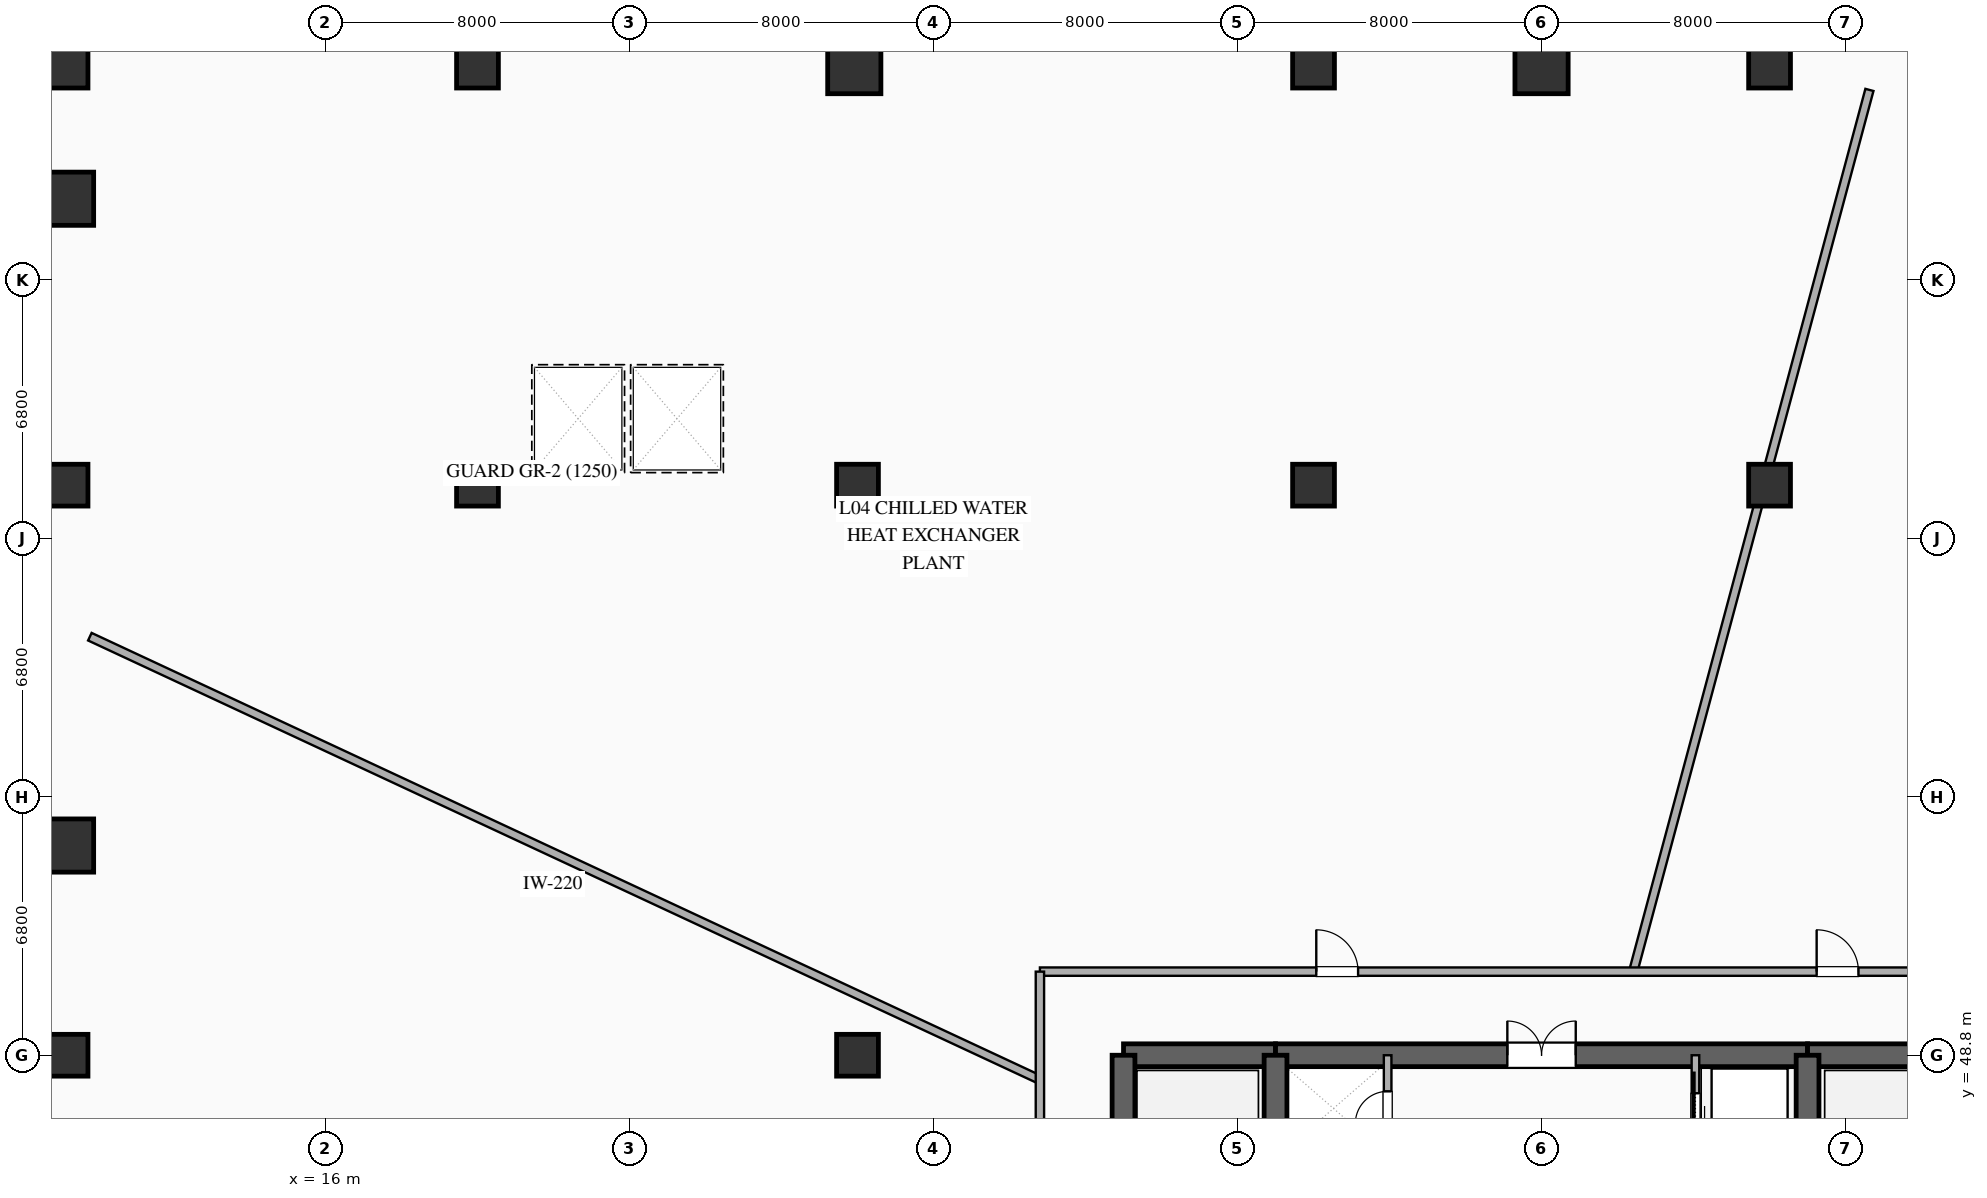
"""IFC4 building model, lengths in metres.
Left out: names, types, materials, properties, quantities, classifications, styles, units other than length and angle.
Written with IfcOpenShell. Run it as: python <this file> out.ifc"""

import sys

from ifc_helpers import new_model, si_unit, direction, frame, frame_2d, origin, origin_2d, place, context, subcontext, project, spatial, rectangle, extrude, element, fill, save


model = new_model("IFC4")
c1 = context("Model", 3, precision=1e-05, world=origin(), true_north=direction((0.0, 1.0)))
c2 = subcontext(c1, "Body", "Model", "MODEL_VIEW")
j1 = project(units=[si_unit("LENGTHUNIT", "METRE"), si_unit("PLANEANGLEUNIT", "RADIAN")], contexts=[c1])
p1 = place(None, origin())
s1 = spatial("IfcSite", under=j1, at=p1, CompositionType="ELEMENT")
p2 = place(p1, origin())
s2 = spatial("IfcBuilding", under=s1, at=p2, CompositionType="ELEMENT")
p3 = place(p2, frame((0.0, 0.0, 22.2)))
s3 = spatial("IfcBuildingStorey", under=s2, at=p3, CompositionType="ELEMENT", Elevation=22.2)
p4 = place(p3, frame((37.0, 48.8, 0.0), z_axis=(0.0, 0.0, 1.0), x_axis=(1.0, 0.0, 0.0)))
e1 = element("IfcWall", 1, at=p4, inside=s3, PredefinedType="SHEAR", context=c2, shape_type="SweptSolid", body=[
    extrude(rectangle(XDim=4.0, YDim=0.6, at=frame_2d((2.0, 0.0))), origin(), (0.0, 0.0, 1.0), 5.75),
])
p5 = place(p3, frame((41.0, 48.8, 0.0), z_axis=(0.0, 0.0, 1.0), x_axis=(1.0, 0.0, 0.0)))
e2 = element("IfcWall", 2, at=p5, inside=s3, PredefinedType="SHEAR", context=c2, shape_type="SweptSolid", body=[
    extrude(rectangle(XDim=14.0, YDim=0.6, at=frame_2d((7.0, 0.0))), origin(), (0.0, 0.0, 1.0), 5.75),
])
p6 = place(p5, frame((6.1, 0.0, 0.0)))
e3 = element("IfcOpeningElement", 3, at=p6, cuts=e2, PredefinedType="OPENING", context=c2, shape_type="SweptSolid", body=[
    extrude(rectangle(XDim=1.8, YDim=2.25, at=frame_2d((0.9, 1.125))), frame((0.0, 0.31, 0.0), z_axis=(0.0, -1.0, 0.0), x_axis=(1.0, 0.0, 0.0)), (0.0, 0.0, 1.0), 0.62),
])
p7 = place(p3, frame((55.0, 48.8, 0.0), z_axis=(0.0, 0.0, 1.0), x_axis=(1.0, 0.0, 0.0)))
e4 = element("IfcWall", 4, at=p7, inside=s3, PredefinedType="SHEAR", context=c2, shape_type="SweptSolid", body=[
    extrude(rectangle(XDim=4.0, YDim=0.6, at=frame_2d((2.0, 0.0))), origin(), (0.0, 0.0, 1.0), 5.75),
])
p8 = place(p3, frame((37.0, 35.2, 0.0), z_axis=(0.0, 0.0, 1.0), x_axis=(0.0, 1.0, 0.0)))
e5 = element("IfcWall", 5, at=p8, inside=s3, PredefinedType="SHEAR", context=c2, shape_type="SweptSolid", body=[
    extrude(rectangle(XDim=13.6, YDim=0.6, at=frame_2d((6.8, 0.0))), origin(), (0.0, 0.0, 1.0), 5.75),
])
p9 = place(p8, frame((1.5, 0.0, 0.0)))
e6 = element("IfcOpeningElement", 6, at=p9, cuts=e5, PredefinedType="OPENING", context=c2, shape_type="SweptSolid", body=[
    extrude(rectangle(XDim=1.2, YDim=2.15, at=frame_2d((0.6, 1.075))), frame((0.0, 0.31, 0.0), z_axis=(0.0, -1.0, 0.0), x_axis=(1.0, 0.0, 0.0)), (0.0, 0.0, 1.0), 0.62),
])
p10 = place(p3, frame((41.0, 35.2, 0.0), z_axis=(0.0, 0.0, 1.0), x_axis=(0.0, 1.0, 0.0)))
e7 = element("IfcWall", 7, at=p10, inside=s3, PredefinedType="SHEAR", context=c2, shape_type="SweptSolid", body=[
    extrude(rectangle(XDim=13.6, YDim=0.6, at=frame_2d((6.8, 0.0))), origin(), (0.0, 0.0, 1.0), 5.75),
])
p11 = place(p10, frame((1.15, 0.0, 0.0)))
e8 = element("IfcOpeningElement", 8, at=p11, cuts=e7, PredefinedType="OPENING", context=c2, shape_type="SweptSolid", body=[
    extrude(rectangle(XDim=1.1, YDim=2.2, at=frame_2d((0.55, 1.1))), frame((0.0, 0.31, 0.0), z_axis=(0.0, -1.0, 0.0), x_axis=(1.0, 0.0, 0.0)), (0.0, 0.0, 1.0), 0.62),
])
p12 = place(p3, frame((55.0, 35.2, 0.0), z_axis=(0.0, 0.0, 1.0), x_axis=(0.0, 1.0, 0.0)))
e9 = element("IfcWall", 9, at=p12, inside=s3, PredefinedType="SHEAR", context=c2, shape_type="SweptSolid", body=[
    extrude(rectangle(XDim=13.6, YDim=0.6, at=frame_2d((6.8, 0.0))), origin(), (0.0, 0.0, 1.0), 5.75),
])
p13 = place(p12, frame((1.15, 0.0, 0.0)))
e10 = element("IfcOpeningElement", 10, at=p13, cuts=e9, PredefinedType="OPENING", context=c2, shape_type="SweptSolid", body=[
    extrude(rectangle(XDim=1.1, YDim=2.2, at=frame_2d((0.55, 1.1))), frame((0.0, 0.31, 0.0), z_axis=(0.0, -1.0, 0.0), x_axis=(1.0, 0.0, 0.0)), (0.0, 0.0, 1.0), 0.62),
])
for number, where, z_axis, x_axis in (
    (11, (9.2, 74.8, 0.0), (0.0, 0.0, 1.0), (1.0, 0.0, 0.0)),
    (12, (9.2, 63.8, 0.0), (0.0, 0.0, 1.0), (1.0, 0.0, 0.0)),
    (13, (20.0, 74.8, 0.0), (0.0, 0.0, 1.0), (1.0, 0.0, 0.0)),
    (14, (20.0, 63.8, 0.0), (0.0, 0.0, 1.0), (1.0, 0.0, 0.0)),
    (15, (30.0, 63.8, 0.0), (0.0, 0.0, 1.0), (1.0, 0.0, 0.0)),
    (16, (42.0, 74.8, 0.0), (0.0, 0.0, 1.0), (1.0, 0.0, 0.0)),
    (17, (42.0, 63.8, 0.0), (0.0, 0.0, 1.0), (1.0, 0.0, 0.0)),
    (18, (54.0, 74.8, 0.0), (0.0, 0.0, 1.0), (1.0, 0.0, 0.0)),
    (19, (54.0, 63.8, 0.0), (0.0, 0.0, 1.0), (1.0, 0.0, 0.0)),
    (20, (9.2, 48.8, 0.0), (0.0, 0.0, 1.0), (1.0, 0.0, 0.0)),
    (21, (30.0, 48.8, 0.0), (0.0, 0.0, 1.0), (1.0, 0.0, 0.0)),
):
    element("IfcColumn", number, at=place(p3, frame(where, z_axis=z_axis, x_axis=x_axis)), inside=s3, PredefinedType="COLUMN", context=c2, shape_type="SweptSolid", body=[
        extrude(rectangle(XDim=1.1, YDim=1.1, at=origin_2d()), origin(), (0.0, 0.0, 1.0), 5.75),
    ])
for number, where, z_axis, x_axis in (
    (22, (48.0, 74.8, 0.0), (0.0, 0.0, 1.0), (1.0, 0.0, 0.0)),
    (23, (29.916, 74.8, 0.0), (0.0, 0.0, 1.0), (1.0, 0.0, 0.0)),
    (24, (9.2, 71.337, 0.0), (0.0, 0.0, 1.0), (1.0, 0.0, 0.0)),
    (25, (9.2, 54.318, 0.0), (0.0, 0.0, 1.0), (1.0, 0.0, 0.0)),
):
    element("IfcColumn", number, at=place(p3, frame(where, z_axis=z_axis, x_axis=x_axis)), inside=s3, PredefinedType="COLUMN", context=c2, shape_type="SweptSolid", body=[
        extrude(rectangle(XDim=1.4, YDim=1.4, at=origin_2d()), origin(), (0.0, 0.0, 1.0), 5.75),
    ])
p14 = place(p3, frame((9.65, 75.85, 0.0), z_axis=(0.0, 0.0, 1.0), x_axis=(-0.707106781187, -0.707106781187, 0.0)))
e26 = element("IfcWall", 26, at=p14, inside=s3, PredefinedType="SOLIDWALL", context=c2, shape_type="SweptSolid", body=[
    extrude(rectangle(XDim=2.121, YDim=0.3, at=frame_2d((1.061, 0.0))), origin(), (0.0, 0.0, 1.0), 5.75),
])
p15 = place(p3, frame((43.95, 46.2, 0.0), z_axis=(0.0, 0.0, 1.0), x_axis=(0.0, 1.0, 0.0)))
e27 = element("IfcWall", 27, at=p15, inside=s3, PredefinedType="SOLIDWALL", context=c2, shape_type="SweptSolid", body=[
    extrude(rectangle(XDim=2.6, YDim=0.2, at=frame_2d((1.3, 0.0))), origin(), (0.0, 0.0, 1.0), 2.5),
])
p16 = place(p15, frame((0.8, 0.0, 0.0)))
e28 = element("IfcOpeningElement", 28, at=p16, cuts=e27, PredefinedType="OPENING", context=c2, shape_type="SweptSolid", body=[
    extrude(rectangle(XDim=0.85, YDim=2.15, at=frame_2d((0.425, 1.075))), frame((0.0, 0.11, 0.0), z_axis=(0.0, -1.0, 0.0), x_axis=(1.0, 0.0, 0.0)), (0.0, 0.0, 1.0), 0.22),
])
p17 = place(p3, frame((52.05, 38.4, 0.0), z_axis=(0.0, 0.0, 1.0), x_axis=(0.0, 1.0, 0.0)))
e29 = element("IfcWall", 29, at=p17, inside=s3, PredefinedType="SOLIDWALL", context=c2, shape_type="SweptSolid", body=[
    extrude(rectangle(XDim=10.4, YDim=0.2, at=frame_2d((5.2, 0.0))), origin(), (0.0, 0.0, 1.0), 2.5),
])
p18 = place(p17, frame((8.2, 0.0, 0.0)))
e30 = element("IfcOpeningElement", 30, at=p18, cuts=e29, PredefinedType="OPENING", context=c2, shape_type="SweptSolid", body=[
    extrude(rectangle(XDim=1.2, YDim=2.2, at=frame_2d((0.6, 1.1))), frame((0.0, 0.11, 0.0), z_axis=(0.0, -1.0, 0.0), x_axis=(1.0, 0.0, 0.0)), (0.0, 0.0, 1.0), 0.22),
])
p19 = place(p3, frame((34.8, 48.155, 0.0), z_axis=(0.0, 0.0, 1.0), x_axis=(-0.906307462258, 0.422618958231, 0.0)))
e31 = element("IfcWall", 31, at=p19, inside=s3, PredefinedType="SOLIDWALL", context=c2, shape_type="SweptSolid", body=[
    extrude(rectangle(XDim=27.584, YDim=0.22, at=frame_2d((13.792, 0.0))), origin(), (0.0, 0.0, 1.0), 2.5),
])
p20 = place(p3, frame((50.412, 51.0, 0.0), z_axis=(0.0, 0.0, 1.0), x_axis=(0.25881517655, 0.965926862856, 0.0)))
e32 = element("IfcWall", 32, at=p20, inside=s3, PredefinedType="SOLIDWALL", context=c2, shape_type="SweptSolid", body=[
    extrude(rectangle(XDim=24.018, YDim=0.22, at=frame_2d((12.009, 0.0))), origin(), (0.0, 0.0, 1.0), 2.5),
])
p21 = place(p3, frame((34.8, 51.0, 0.0), z_axis=(0.0, 0.0, 1.0), x_axis=(1.0, 0.0, 0.0)))
e33 = element("IfcWall", 33, at=p21, inside=s3, PredefinedType="SOLIDWALL", context=c2, shape_type="SweptSolid", body=[
    extrude(rectangle(XDim=26.4, YDim=0.22, at=frame_2d((13.2, 0.0))), origin(), (0.0, 0.0, 1.0), 2.5),
])
p22 = place(p21, frame((7.272, 0.0, 0.0)))
e34 = element("IfcOpeningElement", 34, at=p22, cuts=e33, PredefinedType="OPENING", context=c2, shape_type="SweptSolid", body=[
    extrude(rectangle(XDim=1.1, YDim=2.15, at=frame_2d((0.55, 1.075))), frame((0.0, 0.12, 0.0), z_axis=(0.0, -1.0, 0.0), x_axis=(1.0, 0.0, 0.0)), (0.0, 0.0, 1.0), 0.24),
])
p23 = place(p21, frame((20.439, 0.0, 0.0)))
e35 = element("IfcOpeningElement", 35, at=p23, cuts=e33, PredefinedType="OPENING", context=c2, shape_type="SweptSolid", body=[
    extrude(rectangle(XDim=1.1, YDim=2.15, at=frame_2d((0.55, 1.075))), frame((0.0, 0.12, 0.0), z_axis=(0.0, -1.0, 0.0), x_axis=(1.0, 0.0, 0.0)), (0.0, 0.0, 1.0), 0.24),
])
p24 = place(p3, frame((34.8, 33.0, 0.0), z_axis=(0.0, 0.0, 1.0), x_axis=(0.0, 1.0, 0.0)))
e36 = element("IfcWall", 36, at=p24, inside=s3, PredefinedType="SOLIDWALL", context=c2, shape_type="SweptSolid", body=[
    extrude(rectangle(XDim=18.0, YDim=0.22, at=frame_2d((9.0, 0.0))), origin(), (0.0, 0.0, 1.0), 2.5),
])
p25 = place(p24, frame((8.45, 0.0, 0.0)))
e37 = element("IfcOpeningElement", 37, at=p25, cuts=e36, PredefinedType="OPENING", context=c2, shape_type="SweptSolid", body=[
    extrude(rectangle(XDim=1.1, YDim=2.15, at=frame_2d((0.55, 1.075))), frame((0.0, 0.12, 0.0), z_axis=(0.0, -1.0, 0.0), x_axis=(1.0, 0.0, 0.0)), (0.0, 0.0, 1.0), 0.24),
])
p26 = place(p6, origin())
e38 = element("IfcDoor", 38, at=p26, inside=s3, OperationType="DOUBLE_DOOR_SINGLE_SWING", PredefinedType="DOOR", context=c2, shape_type="SweptSolid", body=[
    extrude(rectangle(XDim=1.8, YDim=2.25, at=frame_2d((0.9, 1.125))), frame((0.0, 0.025, 0.0), z_axis=(0.0, -1.0, 0.0), x_axis=(1.0, 0.0, 0.0)), (0.0, 0.0, 1.0), 0.05),
])
fill(e3, e38)
p27 = place(p16, origin())
e39 = element("IfcDoor", 39, at=p27, inside=s3, OperationType="SINGLE_SWING_LEFT", PredefinedType="DOOR", context=c2, shape_type="SweptSolid", body=[
    extrude(rectangle(XDim=0.85, YDim=2.15, at=frame_2d((0.425, 1.075))), frame((0.0, 0.025, 0.0), z_axis=(0.0, -1.0, 0.0), x_axis=(1.0, 0.0, 0.0)), (0.0, 0.0, 1.0), 0.05),
])
fill(e28, e39)
p28 = place(p18, origin())
e40 = element("IfcDoor", 40, at=p28, inside=s3, OperationType="SLIDING_TO_RIGHT", PredefinedType="DOOR", context=c2, shape_type="SweptSolid", body=[
    extrude(rectangle(XDim=1.2, YDim=2.2, at=frame_2d((0.6, 1.1))), frame((0.0, 0.025, 0.0), z_axis=(0.0, -1.0, 0.0), x_axis=(1.0, 0.0, 0.0)), (0.0, 0.0, 1.0), 0.05),
])
fill(e30, e40)
p29 = place(p22, origin())
e41 = element("IfcDoor", 41, at=p29, inside=s3, OperationType="SINGLE_SWING_LEFT", PredefinedType="DOOR", context=c2, shape_type="SweptSolid", body=[
    extrude(rectangle(XDim=1.1, YDim=2.15, at=frame_2d((0.55, 1.075))), frame((0.0, 0.025, 0.0), z_axis=(0.0, -1.0, 0.0), x_axis=(1.0, 0.0, 0.0)), (0.0, 0.0, 1.0), 0.05),
])
fill(e34, e41)
p30 = place(p23, origin())
e42 = element("IfcDoor", 42, at=p30, inside=s3, OperationType="SINGLE_SWING_LEFT", PredefinedType="DOOR", context=c2, shape_type="SweptSolid", body=[
    extrude(rectangle(XDim=1.1, YDim=2.15, at=frame_2d((0.55, 1.075))), frame((0.0, 0.025, 0.0), z_axis=(0.0, -1.0, 0.0), x_axis=(1.0, 0.0, 0.0)), (0.0, 0.0, 1.0), 0.05),
])
fill(e35, e42)
save(model, sys.argv[1])
